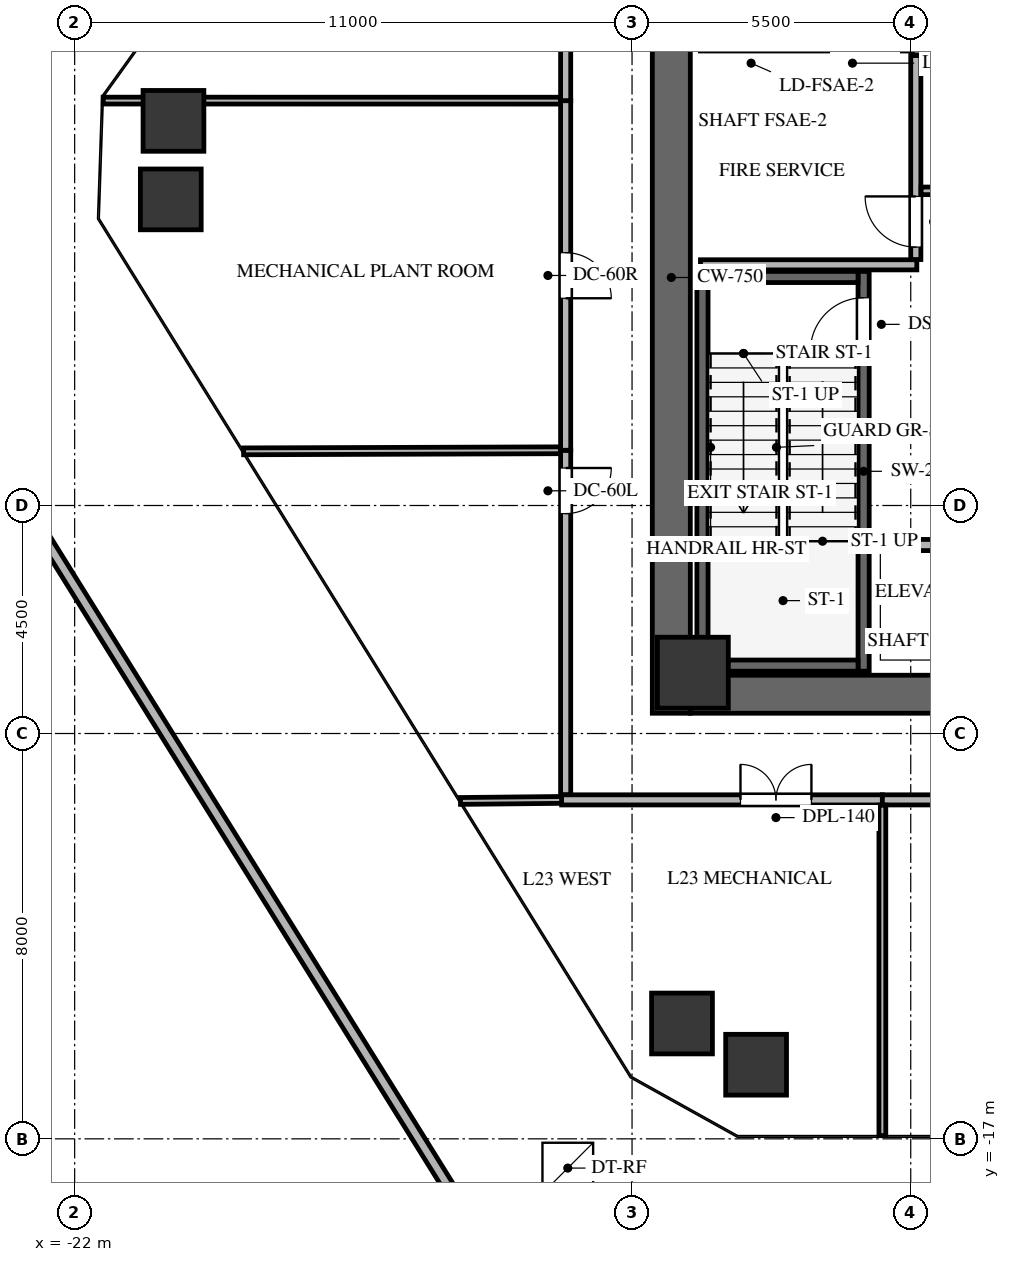
"""IFC4 building model, lengths in metres.
Left out: names, types, materials, properties, quantities, classifications, styles, units other than length and angle.
Written with IfcOpenShell. Run it as: python <this file> out.ifc"""

import sys

from ifc_helpers import new_model, si_unit, direction, frame, frame_2d, origin, origin_2d, place, context, subcontext, project, spatial, rectangle, extrude, source, transform, mapped, element, fill, save


model = new_model("IFC4")
c1 = context("Model", 3, precision=1e-05, world=origin(), true_north=direction((0.0, 1.0)))
c2 = subcontext(c1, "Body", "Model", "MODEL_VIEW")
j1 = project(units=[si_unit("LENGTHUNIT", "METRE"), si_unit("PLANEANGLEUNIT", "RADIAN")], contexts=[c1])
p1 = place(None, origin())
s1 = spatial("IfcSite", under=j1, at=p1, CompositionType="ELEMENT")
p2 = place(p1, origin())
s2 = spatial("IfcBuilding", under=s1, at=p2, CompositionType="ELEMENT")
p3 = place(p2, frame((0.0, 0.0, 88.5)))
s3 = spatial("IfcBuildingStorey", under=s2, at=p3, CompositionType="ELEMENT", Elevation=88.5)
p4 = place(p3, frame((-10.225, -8.6, 0.0), z_axis=(0.0, 0.0, 1.0), x_axis=(0.0, 1.0, 0.0)))
e1 = element("IfcWall", 1, at=p4, inside=s3, PredefinedType="SHEAR", context=c2, shape_type="SweptSolid", body=[
    extrude(rectangle(XDim=17.2, YDim=0.75, at=frame_2d((8.6, 0.0))), origin(), (0.0, 0.0, 1.0), 4.8),
])
p5 = place(p3, frame((-9.85, -8.225, 0.0), z_axis=(0.0, 0.0, 1.0), x_axis=(1.0, 0.0, 0.0)))
e2 = element("IfcWall", 2, at=p5, inside=s3, PredefinedType="SHEAR", context=c2, shape_type="SweptSolid", body=[
    extrude(rectangle(XDim=7.75, YDim=0.75, at=frame_2d((3.875, 0.0))), origin(), (0.0, 0.0, 1.0), 4.8),
])
p6 = place(p3, frame((-6.43, -7.77, -0.3), z_axis=(0.0, 0.0, 1.0), x_axis=(0.0, 1.0, 0.0)))
e3 = element("IfcWall", 3, at=p6, inside=s3, PredefinedType="SHEAR", context=c2, shape_type="SweptSolid", body=[
    extrude(rectangle(XDim=7.89, YDim=0.22, at=frame_2d((3.945, 0.0))), origin(), (0.0, 0.0, 1.0), 4.8),
])
p7 = place(p6, frame((6.32, 0.0, 0.0)))
e4 = element("IfcOpeningElement", 4, at=p7, cuts=e3, PredefinedType="OPENING", context=c2, shape_type="SweptSolid", body=[
    extrude(rectangle(XDim=1.05, YDim=2.15, at=frame_2d((0.525, 1.075))), frame((0.0, 0.12, 0.0), z_axis=(0.0, -1.0, 0.0), x_axis=(1.0, 0.0, 0.0)), (0.0, 0.0, 1.0), 0.24),
])
p8 = place(p3, frame((-9.61, 0.12, -0.3), z_axis=(0.0, 0.0, 1.0), x_axis=(0.0, -1.0, 0.0)))
e5 = element("IfcWall", 5, at=p8, inside=s3, PredefinedType="SHEAR", context=c2, shape_type="SweptSolid", body=[
    extrude(rectangle(XDim=7.89, YDim=0.22, at=frame_2d((3.945, 0.0))), origin(), (0.0, 0.0, 1.0), 4.8),
])
for number, where, z_axis, x_axis in (
    (6, (-9.5, -7.66, -0.3), (0.0, 0.0, 1.0), (1.0, 0.0, 0.0)),
    (7, (-6.54, 0.01, -0.3), (0.0, 0.0, 1.0), (-1.0, 0.0, 0.0)),
):
    element("IfcWall", number, at=place(p3, frame(where, z_axis=z_axis, x_axis=x_axis)), inside=s3, PredefinedType="SHEAR", context=c2, shape_type="SweptSolid", body=[
        extrude(rectangle(XDim=2.96, YDim=0.22, at=frame_2d((1.48, 0.0))), origin(), (0.0, 0.0, 1.0), 4.8),
    ])
p9 = place(p3, frame((-5.36, 7.78, -0.3), z_axis=(0.0, 0.0, 1.0), x_axis=(0.0, -1.0, 0.0)))
e8 = element("IfcWall", 8, at=p9, inside=s3, PredefinedType="SHEAR", context=c2, shape_type="SweptSolid", body=[
    extrude(rectangle(XDim=3.4, YDim=0.22, at=frame_2d((1.7, 0.0))), origin(), (0.0, 0.0, 1.0), 4.8),
])
p10 = place(p3, frame((-5.25, 4.49, -0.3), z_axis=(0.0, 0.0, 1.0), x_axis=(1.0, 0.0, 0.0)))
e9 = element("IfcWall", 9, at=p10, inside=s3, PredefinedType="SHEAR", context=c2, shape_type="SweptSolid", body=[
    extrude(rectangle(XDim=7.35, YDim=0.22, at=frame_2d((3.675, 0.0))), origin(), (0.0, 0.0, 1.0), 4.8),
])
p11 = place(p10, frame((5.85, 0.0, 0.0)))
e10 = element("IfcOpeningElement", 10, at=p11, cuts=e9, PredefinedType="OPENING", context=c2, shape_type="SweptSolid", body=[
    extrude(rectangle(XDim=1.05, YDim=2.15, at=frame_2d((0.525, 1.075))), frame((0.0, 0.12, 0.0), z_axis=(0.0, -1.0, 0.0), x_axis=(1.0, 0.0, 0.0)), (0.0, 0.0, 1.0), 0.24),
])
m1 = source(origin(), c2, "Body", "SweptSolid", [
    extrude(rectangle(XDim=1.4, YDim=1.4, at=origin_2d()), origin(), (0.0, 0.0, 1.0), 4.8),
])
p12 = place(p3, frame((-9.8, -7.8, -0.3), z_axis=(0.0, 0.0, 1.0), x_axis=(1.0, 0.0, 0.0)))
e11 = element("IfcColumn", 11, at=p12, inside=s3, PredefinedType="COLUMN", context=c2, shape_type="MappedRepresentation", body=[
    mapped(m1, transform((0.0, 0.0, 0.0), x_axis=(1.0, 0.0, 0.0), y_axis=(0.0, 1.0, 0.0), z_axis=(0.0, 0.0, 1.0), scale=1.0)),
])
m2 = source(origin(), c2, "Body", "SweptSolid", [
    extrude(rectangle(XDim=1.2, YDim=1.2, at=origin_2d()), origin(), (0.0, 0.0, 1.0), 4.8),
])
for number, where, z_axis, x_axis in (
    (12, (-10.014, -14.723, -0.3), (0.0, 0.0, 1.0), (1.0, 0.0, 0.0)),
    (13, (-20.103, 1.542, -0.3), (0.0, 0.0, 1.0), (1.0, 0.0, 0.0)),
    (14, (-20.05, 3.091, -0.3), (0.0, 0.0, 1.0), (1.0, 0.0, 0.0)),
    (15, (-8.552, -15.537, -0.3), (0.0, 0.0, 1.0), (1.0, 0.0, 0.0)),
):
    element("IfcColumn", number, at=place(p3, frame(where, z_axis=z_axis, x_axis=x_axis)), inside=s3, PredefinedType="COLUMN", context=c2, shape_type="MappedRepresentation", body=[
        mapped(m2, transform((0.0, 0.0, 0.0), x_axis=(1.0, 0.0, 0.0), y_axis=(0.0, 1.0, 0.0), z_axis=(0.0, 0.0, 1.0), scale=1.0)),
    ])
p13 = place(p3, frame((-13.901, -19.104, 0.0), z_axis=(0.0, 0.0, 1.0), x_axis=(-0.528591126558, 0.848876564009, 0.0)))
e16 = element("IfcWall", 16, at=p13, inside=s3, PredefinedType="PARAPET", context=c2, shape_type="SweptSolid", body=[
    extrude(rectangle(XDim=21.741, YDim=0.22, at=frame_2d((10.871, 0.0))), origin(), (0.0, 0.0, 1.0), 1.2),
])
p14 = place(p3, frame((-25.311, 1.783, 0.0), z_axis=(0.0, 0.0, 1.0), x_axis=(0.584819348165, 0.81116356551, 0.0)))
e17 = element("IfcWall", 17, at=p14, inside=s3, PredefinedType="PARAPET", context=c2, shape_type="SweptSolid", body=[
    extrude(rectangle(XDim=21.441, YDim=0.22, at=frame_2d((10.72, 0.0))), origin(), (0.0, 0.0, 1.0), 1.2),
])
p15 = place(p3, frame((-9.65, 0.25, 0.0), z_axis=(0.0, 0.0, 1.0), x_axis=(1.0, 0.0, 0.0)))
e18 = element("IfcWall", 18, at=p15, inside=s3, PredefinedType="SOLIDWALL", context=c2, shape_type="SweptSolid", body=[
    extrude(rectangle(XDim=4.27, YDim=0.2, at=frame_2d((2.135, 0.0))), origin(), (0.0, 0.0, 1.0), 4.485),
])
p16 = place(p3, frame((-5.4, 0.354, 0.0), z_axis=(0.0, 0.0, 1.0), x_axis=(0.0, 1.0, 0.0)))
e19 = element("IfcWall", 19, at=p16, inside=s3, PredefinedType="SOLIDWALL", context=c2, shape_type="SweptSolid", body=[
    extrude(rectangle(XDim=4.026, YDim=0.2, at=frame_2d((2.013, 0.0))), origin(), (0.0, 0.0, 1.0), 4.485),
])
p17 = place(p16, frame((0.246, 0.0, 0.0)))
e20 = element("IfcOpeningElement", 20, at=p17, cuts=e19, PredefinedType="OPENING", context=c2, shape_type="SweptSolid", body=[
    extrude(rectangle(XDim=1.0, YDim=2.15, at=frame_2d((0.5, 1.075))), frame((0.0, 0.11, 0.0), z_axis=(0.0, -1.0, 0.0), x_axis=(1.0, 0.0, 0.0)), (0.0, 0.0, 1.0), 0.22),
])
p18 = place(p3, frame((-6.25, -5.28, 0.0), z_axis=(0.0, 0.0, 1.0), x_axis=(1.0, 0.0, 0.0)))
e21 = element("IfcWall", 21, at=p18, inside=s3, PredefinedType="SOLIDWALL", context=c2, shape_type="SweptSolid", body=[
    extrude(rectangle(XDim=3.9, YDim=0.22, at=frame_2d((1.95, 0.0))), origin(), (0.0, 0.0, 1.0), 4.485),
])
p19 = place(p3, frame((-2.42, 1.71, 0.0), z_axis=(0.0, 0.0, 1.0), x_axis=(-1.0, 0.0, 0.0)))
e22 = element("IfcWall", 22, at=p19, inside=s3, PredefinedType="PARTITIONING", context=c2, shape_type="SweptSolid", body=[
    extrude(rectangle(XDim=2.876, YDim=0.15, at=frame_2d((1.438, 0.0))), origin(), (0.0, 0.0, 1.0), 4.485),
])
p20 = place(p19, frame((0.988, 0.0, 0.0)))
e23 = element("IfcOpeningElement", 23, at=p20, cuts=e22, PredefinedType="OPENING", context=c2, shape_type="SweptSolid", body=[
    extrude(rectangle(XDim=0.9, YDim=2.05, at=frame_2d((0.45, 1.025))), frame((0.0, 0.085, 0.0), z_axis=(0.0, -1.0, 0.0), x_axis=(1.0, 0.0, 0.0)), (0.0, 0.0, 1.0), 0.17),
])
p21 = place(p3, frame((-12.39, -10.31, 0.0), z_axis=(0.0, 0.0, 1.0), x_axis=(1.0, 0.0, 0.0)))
e24 = element("IfcWall", 24, at=p21, inside=s3, PredefinedType="SOLIDWALL", context=c2, shape_type="SweptSolid", body=[
    extrude(rectangle(XDim=6.33, YDim=0.2, at=frame_2d((3.165, 0.0))), origin(), (0.0, 0.0, 1.0), 4.485),
])
p22 = place(p21, frame((3.53, 0.0, 0.0)))
e25 = element("IfcOpeningElement", 25, at=p22, cuts=e24, PredefinedType="OPENING", context=c2, shape_type="SweptSolid", body=[
    extrude(rectangle(XDim=1.4, YDim=2.15, at=frame_2d((0.7, 1.075))), frame((0.0, 0.11, 0.0), z_axis=(0.0, -1.0, 0.0), x_axis=(1.0, 0.0, 0.0)), (0.0, 0.0, 1.0), 0.22),
])
p23 = place(p3, frame((-6.06, -10.31, 0.0), z_axis=(0.0, 0.0, 1.0), x_axis=(1.0, 0.0, 0.0)))
e26 = element("IfcWall", 26, at=p23, inside=s3, PredefinedType="SOLIDWALL", context=c2, shape_type="SweptSolid", body=[
    extrude(rectangle(XDim=6.1, YDim=0.2, at=frame_2d((3.05, 0.0))), origin(), (0.0, 0.0, 1.0), 3.652),
])
p24 = place(p23, frame((2.35, 0.0, 0.0)))
e27 = element("IfcOpeningElement", 27, at=p24, cuts=e26, PredefinedType="OPENING", context=c2, shape_type="SweptSolid", body=[
    extrude(rectangle(XDim=1.4, YDim=2.15, at=frame_2d((0.7, 1.075))), frame((0.0, 0.11, 0.0), z_axis=(0.0, -1.0, 0.0), x_axis=(1.0, 0.0, 0.0)), (0.0, 0.0, 1.0), 0.22),
])
p25 = place(p3, frame((-12.31, -3.41, 0.0), z_axis=(0.0, 0.0, 1.0), x_axis=(0.0, -1.0, 0.0)))
e28 = element("IfcWall", 28, at=p25, inside=s3, PredefinedType="SOLIDWALL", context=c2, shape_type="SweptSolid", body=[
    extrude(rectangle(XDim=6.796, YDim=0.2, at=frame_2d((3.398, 0.0))), origin(), (0.0, 0.0, 1.0), 4.485),
])
p26 = place(p25, frame((0.35, 0.0, 0.0)))
e29 = element("IfcOpeningElement", 29, at=p26, cuts=e28, PredefinedType="OPENING", context=c2, shape_type="SweptSolid", body=[
    extrude(rectangle(XDim=0.9, YDim=2.05, at=frame_2d((0.45, 1.025))), frame((0.0, 0.11, 0.0), z_axis=(0.0, -1.0, 0.0), x_axis=(1.0, 0.0, 0.0)), (0.0, 0.0, 1.0), 0.22),
])
p27 = place(p3, frame((-12.31, 3.49, 0.0), z_axis=(0.0, 0.0, 1.0), x_axis=(0.0, -1.0, 0.0)))
e30 = element("IfcWall", 30, at=p27, inside=s3, PredefinedType="SOLIDWALL", context=c2, shape_type="SweptSolid", body=[
    extrude(rectangle(XDim=6.9, YDim=0.2, at=frame_2d((3.45, 0.0))), origin(), (0.0, 0.0, 1.0), 3.652),
])
p28 = place(p27, frame((3.0, 0.0, 0.0)))
e31 = element("IfcOpeningElement", 31, at=p28, cuts=e30, PredefinedType="OPENING", context=c2, shape_type="SweptSolid", body=[
    extrude(rectangle(XDim=0.9, YDim=2.05, at=frame_2d((0.45, 1.025))), frame((0.0, 0.11, 0.0), z_axis=(0.0, -1.0, 0.0), x_axis=(1.0, 0.0, 0.0)), (0.0, 0.0, 1.0), 0.22),
])
p29 = place(p3, frame((-12.31, 10.206, 0.0), z_axis=(0.0, 0.0, 1.0), x_axis=(0.0, -1.0, 0.0)))
e32 = element("IfcWall", 32, at=p29, inside=s3, PredefinedType="SOLIDWALL", context=c2, shape_type="SweptSolid", body=[
    extrude(rectangle(XDim=6.716, YDim=0.2, at=frame_2d((3.358, 0.0))), origin(), (0.0, 0.0, 1.0), 4.485),
])
p30 = place(p29, frame((0.35, 0.0, 0.0)))
e33 = element("IfcOpeningElement", 33, at=p30, cuts=e32, PredefinedType="OPENING", context=c2, shape_type="SweptSolid", body=[
    extrude(rectangle(XDim=0.9, YDim=2.05, at=frame_2d((0.45, 1.025))), frame((0.0, 0.11, 0.0), z_axis=(0.0, -1.0, 0.0), x_axis=(1.0, 0.0, 0.0)), (0.0, 0.0, 1.0), 0.22),
])
p31 = place(p3, frame((-6.06, -10.414, 0.0), z_axis=(0.0, 0.0, 1.0), x_axis=(0.0, -1.0, 0.0)))
e34 = element("IfcWall", 34, at=p31, inside=s3, PredefinedType="PARTITIONING", context=c2, shape_type="SweptSolid", body=[
    extrude(rectangle(XDim=6.523, YDim=0.135, at=frame_2d((3.261, 0.0))), origin(), (0.0, 0.0, 1.0), 3.652),
])
p32 = place(p3, frame((-14.386, -10.331, 0.0), z_axis=(0.0, 0.0, 1.0), x_axis=(0.999948475847, 0.010151140349, 0.0)))
e35 = element("IfcWall", 35, at=p32, inside=s3, PredefinedType="PARTITIONING", context=c2, shape_type="SweptSolid", body=[
    extrude(rectangle(XDim=1.996, YDim=0.135, at=frame_2d((0.998, 0.0))), origin(), (0.0, 0.0, 1.0), 3.82),
])
p33 = place(p3, frame((-18.666, -3.431, 0.0), z_axis=(0.0, 0.0, 1.0), x_axis=(0.999994491252, 0.003319256941, 0.0)))
e36 = element("IfcWall", 36, at=p33, inside=s3, PredefinedType="PARTITIONING", context=c2, shape_type="SweptSolid", body=[
    extrude(rectangle(XDim=6.252, YDim=0.135, at=frame_2d((3.126, 0.0))), origin(), (0.0, 0.0, 1.0), 3.82),
])
p34 = place(p3, frame((-21.437, 3.491, 0.0), z_axis=(0.0, 0.0, 1.0), x_axis=(0.999999986823, -0.000162342053, 0.0)))
e37 = element("IfcWall", 37, at=p34, inside=s3, PredefinedType="PARTITIONING", context=c2, shape_type="SweptSolid", body=[
    extrude(rectangle(XDim=9.023, YDim=0.135, at=frame_2d((4.512, 0.0))), origin(), (0.0, 0.0, 1.0), 3.317),
])
p35 = place(p3, frame((0.0, 0.0, -0.28)))
p36 = place(p35, frame((-17.56, -9.361, -0.01)))
p37 = place(p36, frame((0.0, 0.0, 0.24)))
e38 = element("IfcWindow", 38, at=p37, inside=s3, PartitioningType="SINGLE_PANEL", PredefinedType="SKYLIGHT", context=c2, shape_type="SweptSolid", body=[
    extrude(rectangle(XDim=1.2, YDim=1.2, at=origin_2d()), origin(), (0.0, 0.0, 1.0), 0.05),
])
p38 = place(p35, frame((-21.866, -1.915, -0.01)))
p39 = place(p38, frame((0.0, 0.0, 0.24)))
e39 = element("IfcWindow", 39, at=p39, inside=s3, PartitioningType="SINGLE_PANEL", PredefinedType="SKYLIGHT", context=c2, shape_type="SweptSolid", body=[
    extrude(rectangle(XDim=1.2, YDim=1.2, at=origin_2d()), origin(), (0.0, 0.0, 1.0), 0.05),
])
p40 = place(p35, frame((-12.268, -17.577, -0.01)))
p41 = place(p40, frame((0.0, 0.0, 0.24)))
e40 = element("IfcDoor", 40, at=p41, inside=s3, OperationType="SINGLE_SWING_LEFT", PredefinedType="TRAPDOOR", context=c2, shape_type="SweptSolid", body=[
    extrude(rectangle(XDim=1.0, YDim=1.0, at=origin_2d()), origin(), (0.0, 0.0, 1.0), 0.05),
])
m3 = source(origin(), c2, "Body", "SweptSolid", [
    extrude(rectangle(XDim=1.05, YDim=2.15, at=frame_2d((0.525, 1.075))), frame((0.0, 0.025, 0.0), z_axis=(0.0, -1.0, 0.0), x_axis=(1.0, 0.0, 0.0)), (0.0, 0.0, 1.0), 0.05),
])
p42 = place(p7, origin())
e41 = element("IfcDoor", 41, at=p42, inside=s3, OperationType="SINGLE_SWING_LEFT", PredefinedType="DOOR", context=c2, shape_type="MappedRepresentation", body=[
    mapped(m3, transform((0.0, 0.0, 0.0), x_axis=(1.0, 0.0, 0.0), y_axis=(0.0, 1.0, 0.0), z_axis=(0.0, 0.0, 1.0), scale=1.0)),
])
fill(e4, e41)
m4 = source(origin(), c2, "Body", "SweptSolid", [
    extrude(rectangle(XDim=1.0, YDim=2.15, at=frame_2d((0.5, 1.075))), frame((0.0, 0.025, 0.0), z_axis=(0.0, -1.0, 0.0), x_axis=(1.0, 0.0, 0.0)), (0.0, 0.0, 1.0), 0.05),
])
p43 = place(p17, origin())
e42 = element("IfcDoor", 42, at=p43, inside=s3, OperationType="SINGLE_SWING_RIGHT", PredefinedType="DOOR", context=c2, shape_type="MappedRepresentation", body=[
    mapped(m4, transform((0.0, 0.0, 0.0), x_axis=(1.0, 0.0, 0.0), y_axis=(0.0, 1.0, 0.0), z_axis=(0.0, 0.0, 1.0), scale=1.0)),
])
fill(e20, e42)
m5 = source(origin(), c2, "Body", "SweptSolid", [
    extrude(rectangle(XDim=1.4, YDim=2.15, at=frame_2d((0.7, 1.075))), frame((0.0, 0.025, 0.0), z_axis=(0.0, -1.0, 0.0), x_axis=(1.0, 0.0, 0.0)), (0.0, 0.0, 1.0), 0.05),
])
p44 = place(p22, origin())
e43 = element("IfcDoor", 43, at=p44, inside=s3, OperationType="DOUBLE_DOOR_SINGLE_SWING", PredefinedType="DOOR", context=c2, shape_type="MappedRepresentation", body=[
    mapped(m5, transform((0.0, 0.0, 0.0), x_axis=(1.0, 0.0, 0.0), y_axis=(0.0, 1.0, 0.0), z_axis=(0.0, 0.0, 1.0), scale=1.0)),
])
fill(e25, e43)
m6 = source(origin(), c2, "Body", "SweptSolid", [
    extrude(rectangle(XDim=0.9, YDim=2.05, at=frame_2d((0.45, 1.025))), frame((0.0, 0.025, 0.0), z_axis=(0.0, -1.0, 0.0), x_axis=(1.0, 0.0, 0.0)), (0.0, 0.0, 1.0), 0.05),
])
p45 = place(p26, origin())
e44 = element("IfcDoor", 44, at=p45, inside=s3, OperationType="SINGLE_SWING_LEFT", PredefinedType="DOOR", context=c2, shape_type="MappedRepresentation", body=[
    mapped(m6, transform((0.0, 0.0, 0.0), x_axis=(1.0, 0.0, 0.0), y_axis=(0.0, 1.0, 0.0), z_axis=(0.0, 0.0, 1.0), scale=1.0)),
])
fill(e29, e44)
m7 = source(origin(), c2, "Body", "SweptSolid", [
    extrude(rectangle(XDim=0.9, YDim=2.05, at=frame_2d((0.45, 1.025))), frame((0.0, 0.025, 0.0), z_axis=(0.0, -1.0, 0.0), x_axis=(1.0, 0.0, 0.0)), (0.0, 0.0, 1.0), 0.05),
])
p46 = place(p28, origin())
e45 = element("IfcDoor", 45, at=p46, inside=s3, OperationType="SINGLE_SWING_RIGHT", PredefinedType="DOOR", context=c2, shape_type="MappedRepresentation", body=[
    mapped(m7, transform((0.0, 0.0, 0.0), x_axis=(1.0, 0.0, 0.0), y_axis=(0.0, 1.0, 0.0), z_axis=(0.0, 0.0, 1.0), scale=1.0)),
])
fill(e31, e45)
save(model, sys.argv[1])
